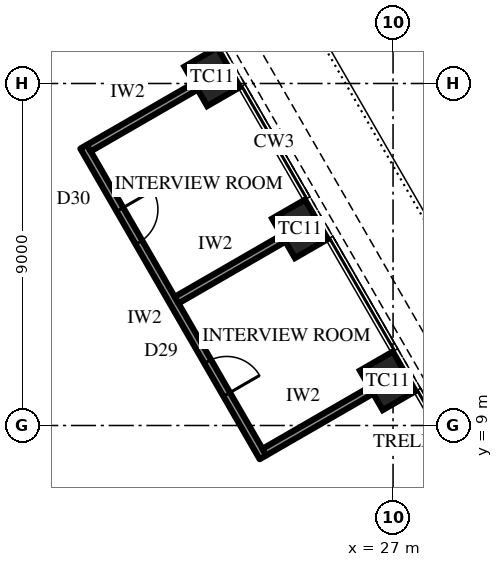
"""IFC4 building model, lengths in metres.
Left out: names, types, materials, properties, quantities, classifications, styles, units other than length and angle.
Written with IfcOpenShell. Run it as: python <this file> out.ifc"""

import sys

from ifc_helpers import new_model, si_unit, direction, frame, frame_2d, origin, origin_2d, place, context, subcontext, project, spatial, rectangle, extrude, element, fill, save


model = new_model("IFC4")
c1 = context("Model", 3, precision=1e-05, world=origin(), true_north=direction((0.0, 1.0)))
c2 = subcontext(c1, "Body", "Model", "MODEL_VIEW")
j1 = project(units=[si_unit("LENGTHUNIT", "METRE"), si_unit("PLANEANGLEUNIT", "RADIAN")], contexts=[c1])
p1 = place(None, origin())
s1 = spatial("IfcSite", under=j1, at=p1, CompositionType="ELEMENT")
p2 = place(p1, origin())
s2 = spatial("IfcBuilding", under=s1, at=p2, CompositionType="ELEMENT")
p3 = place(p2, frame((0.0, 0.0, 274.3)))
s3 = spatial("IfcBuildingStorey", under=s2, at=p3, CompositionType="ELEMENT", Elevation=274.3)
for number, where, z_axis, x_axis in (
    (1, (26.861, 10.175, 0.0), (0.0, 0.0, 1.0), (-0.5, 0.866, 0.0)),
    (2, (24.552, 14.175, 0.0), (0.0, 0.0, 1.0), (-0.5, 0.866, 0.0)),
    (3, (22.242, 18.175, 0.0), (0.0, 0.0, 1.0), (-0.5, 0.866, 0.0)),
):
    element("IfcColumn", number, at=place(p3, frame(where, z_axis=z_axis, x_axis=x_axis)), inside=s3, PredefinedType="COLUMN", context=c2, shape_type="SweptSolid", body=[
        extrude(rectangle(XDim=1.2, YDim=1.0, at=origin_2d()), origin(), (0.0, 0.0, 1.0), 4.2),
    ])
p4 = place(p3, frame((23.577, 8.163, 0.0), z_axis=(0.0, 0.0, 1.0), x_axis=(-0.499989672313, 0.866031366395, 0.0)))
e4 = element("IfcWall", 4, at=p4, inside=s3, PredefinedType="PARTITIONING", context=c2, shape_type="SweptSolid", body=[
    extrude(rectangle(XDim=9.438, YDim=0.2, at=frame_2d((4.719, 0.0))), origin(), (0.0, 0.0, 1.0), 4.0),
])
p5 = place(p4, frame((1.909, 0.0, 0.0)))
e5 = element("IfcOpeningElement", 5, at=p5, cuts=e4, PredefinedType="OPENING", context=c2, shape_type="SweptSolid", body=[
    extrude(rectangle(XDim=1.0, YDim=2.2, at=frame_2d((0.5, 1.1))), frame((0.0, 0.11, 0.0), z_axis=(0.0, -1.0, 0.0), x_axis=(1.0, 0.0, 0.0)), (0.0, 0.0, 1.0), 0.22),
])
p6 = place(p4, frame((6.528, 0.0, 0.0)))
e6 = element("IfcOpeningElement", 6, at=p6, cuts=e4, PredefinedType="OPENING", context=c2, shape_type="SweptSolid", body=[
    extrude(rectangle(XDim=1.0, YDim=2.2, at=frame_2d((0.5, 1.1))), frame((0.0, 0.11, 0.0), z_axis=(0.0, -1.0, 0.0), x_axis=(1.0, 0.0, 0.0)), (0.0, 0.0, 1.0), 0.22),
])
for number, where, z_axis, x_axis in (
    (7, (23.614, 8.3, 0.0), (0.0, 0.0, 1.0), (0.866, 0.5, 0.0)),
    (8, (21.304, 12.3, 0.0), (0.0, 0.0, 1.0), (0.866, 0.5, 0.0)),
    (9, (18.995, 16.3, 0.0), (0.0, 0.0, 1.0), (0.866, 0.5, 0.0)),
):
    element("IfcWall", number, at=place(p3, frame(where, z_axis=z_axis, x_axis=x_axis)), inside=s3, PredefinedType="PARTITIONING", context=c2, shape_type="SweptSolid", body=[
        extrude(rectangle(XDim=3.25, YDim=0.2, at=frame_2d((1.625, 0.0))), origin(), (0.0, 0.0, 1.0), 3.082),
    ])
p7 = place(p5, frame((1.0, 0.0, 0.0), z_axis=(0.0, 0.0, 1.0), x_axis=(-1.0, 0.0, 0.0)))
e10 = element("IfcDoor", 10, at=p7, inside=s3, OperationType="SINGLE_SWING_LEFT", PredefinedType="DOOR", context=c2, shape_type="SweptSolid", body=[
    extrude(rectangle(XDim=1.0, YDim=2.2, at=frame_2d((0.5, 1.1))), frame((0.0, 0.025, 0.0), z_axis=(0.0, -1.0, 0.0), x_axis=(1.0, 0.0, 0.0)), (0.0, 0.0, 1.0), 0.05),
])
fill(e5, e10)
p8 = place(p6, frame((1.0, 0.0, 0.0), z_axis=(0.0, 0.0, 1.0), x_axis=(-1.0, 0.0, 0.0)))
e11 = element("IfcDoor", 11, at=p8, inside=s3, OperationType="SINGLE_SWING_RIGHT", PredefinedType="DOOR", context=c2, shape_type="SweptSolid", body=[
    extrude(rectangle(XDim=1.0, YDim=2.2, at=frame_2d((0.5, 1.1))), frame((0.0, 0.025, 0.0), z_axis=(0.0, -1.0, 0.0), x_axis=(1.0, 0.0, 0.0)), (0.0, 0.0, 1.0), 0.05),
])
fill(e6, e11)
save(model, sys.argv[1])
